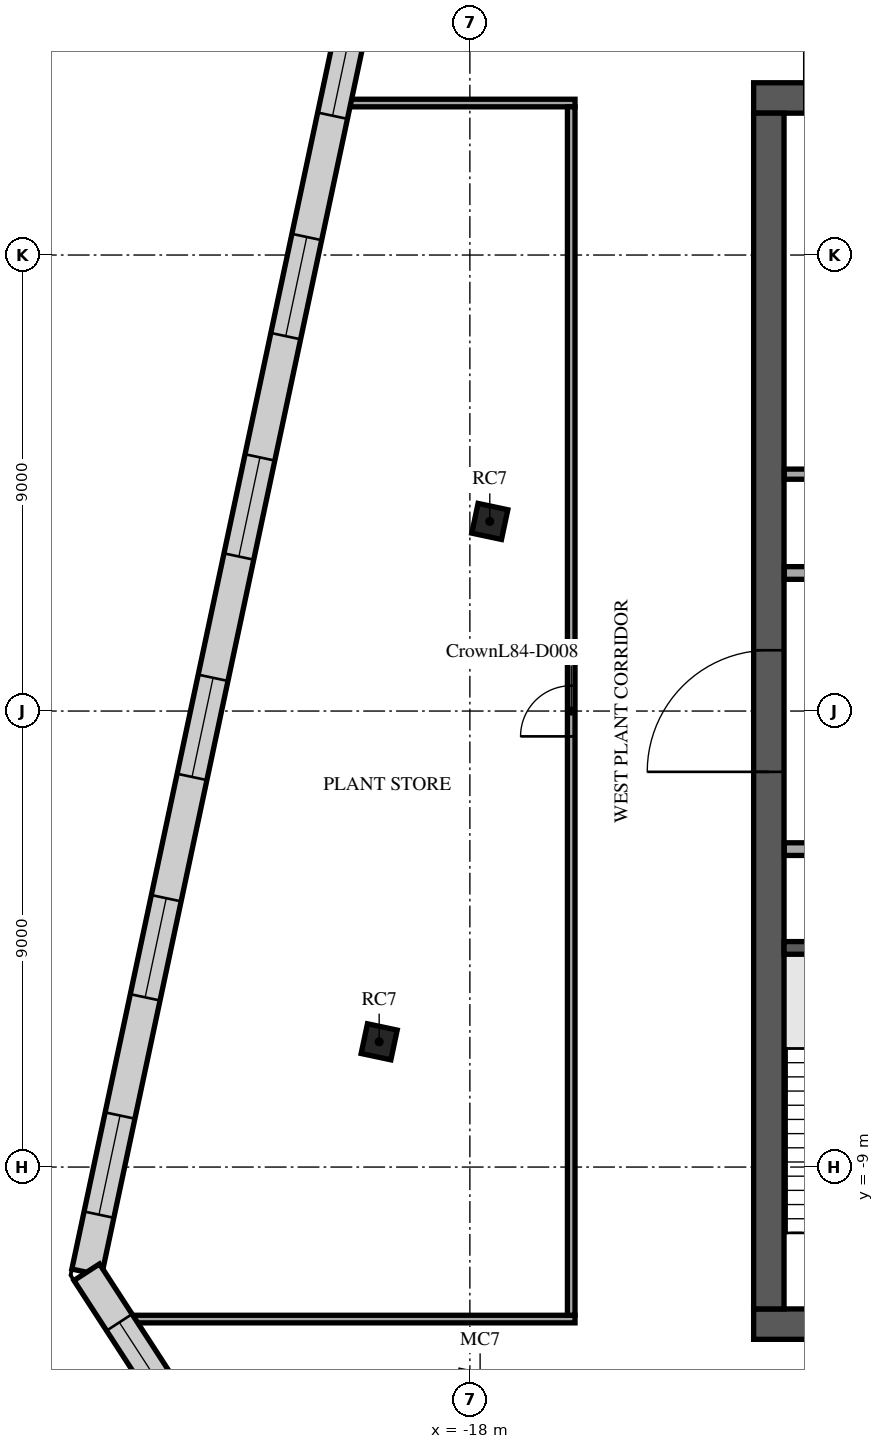
"""IFC4 building model, lengths in metres.
Left out: names, types, materials, properties, quantities, classifications, styles, units other than length and angle.
Written with IfcOpenShell. Run it as: python <this file> out.ifc"""

import sys

from ifc_helpers import new_model, si_unit, direction, frame, frame_2d, origin, origin_2d, place, context, subcontext, project, spatial, rectangle, extrude, element, fill, save


model = new_model("IFC4")
c1 = context("Model", 3, precision=1e-05, world=origin(), true_north=direction((0.0, 1.0)))
c2 = subcontext(c1, "Body", "Model", "MODEL_VIEW")
j1 = project(units=[si_unit("LENGTHUNIT", "METRE"), si_unit("PLANEANGLEUNIT", "RADIAN")], contexts=[c1])
p1 = place(None, origin())
s1 = spatial("IfcSite", under=j1, at=p1, CompositionType="ELEMENT")
p2 = place(p1, origin())
s2 = spatial("IfcBuilding", under=s1, at=p2, CompositionType="ELEMENT")
p3 = place(p2, frame((0.0, 0.0, 358.1)))
s3 = spatial("IfcBuildingStorey", under=s2, at=p3, CompositionType="ELEMENT", Elevation=358.1)
for number, where, z_axis, x_axis in (
    (1, (-17.607, 3.742, 0.0), (0.0, 0.0, 1.0), (0.208, 0.978, 0.0)),
    (2, (-19.79, -6.528, 0.0), (0.0, 0.0, 1.0), (0.208, 0.978, 0.0)),
):
    element("IfcColumn", number, at=place(p3, frame(where, z_axis=z_axis, x_axis=x_axis)), inside=s3, PredefinedType="COLUMN", context=c2, shape_type="SweptSolid", body=[
        extrude(rectangle(XDim=0.6, YDim=0.6, at=origin_2d()), origin(), (0.0, 0.0, 1.0), 5.0),
    ])
p4 = place(p3, frame((-12.4, 12.1, 0.0), z_axis=(0.0, 0.0, 1.0), x_axis=(1.0, 0.0, 0.0)))
e3 = element("IfcWall", 3, at=p4, inside=s3, PredefinedType="SHEAR", context=c2, shape_type="SweptSolid", body=[
    extrude(rectangle(XDim=24.8, YDim=0.6, at=frame_2d((12.4, 0.0))), origin(), (0.0, 0.0, 1.0), 4.7),
])
p5 = place(p4, frame((11.2, 0.0, 0.0)))
e4 = element("IfcOpeningElement", 4, at=p5, cuts=e3, PredefinedType="OPENING", context=c2, shape_type="SweptSolid", body=[
    extrude(rectangle(XDim=2.4, YDim=2.4, at=frame_2d((1.2, 1.2))), frame((0.0, 0.31, 0.0), z_axis=(0.0, -1.0, 0.0), x_axis=(1.0, 0.0, 0.0)), (0.0, 0.0, 1.0), 0.62),
])
p6 = place(p4, frame((22.025, 0.0, 0.0)))
e5 = element("IfcOpeningElement", 5, at=p6, cuts=e3, PredefinedType="OPENING", context=c2, shape_type="SweptSolid", body=[
    extrude(rectangle(XDim=1.2, YDim=2.1, at=frame_2d((0.6, 1.05))), frame((0.0, 0.31, 0.0), z_axis=(0.0, -1.0, 0.0), x_axis=(1.0, 0.0, 0.0)), (0.0, 0.0, 1.0), 0.62),
])
p7 = place(p4, frame((1.0, 0.0, 0.0)))
e6 = element("IfcOpeningElement", 6, at=p7, cuts=e3, PredefinedType="OPENING", context=c2, shape_type="SweptSolid", body=[
    extrude(rectangle(XDim=1.0, YDim=2.1, at=frame_2d((0.5, 1.05))), frame((0.0, 0.31, 0.0), z_axis=(0.0, -1.0, 0.0), x_axis=(1.0, 0.0, 0.0)), (0.0, 0.0, 1.0), 0.62),
])
p8 = place(p3, frame((-12.4, -12.1, 0.0), z_axis=(0.0, 0.0, 1.0), x_axis=(1.0, 0.0, 0.0)))
e7 = element("IfcWall", 7, at=p8, inside=s3, PredefinedType="SHEAR", context=c2, shape_type="SweptSolid", body=[
    extrude(rectangle(XDim=24.8, YDim=0.6, at=frame_2d((12.4, 0.0))), origin(), (0.0, 0.0, 1.0), 4.7),
])
p9 = place(p8, frame((7.3, 0.0, 0.0)))
e8 = element("IfcOpeningElement", 8, at=p9, cuts=e7, PredefinedType="OPENING", context=c2, shape_type="SweptSolid", body=[
    extrude(rectangle(XDim=2.0, YDim=2.1, at=frame_2d((1.0, 1.05))), frame((0.0, 0.31, 0.0), z_axis=(0.0, -1.0, 0.0), x_axis=(1.0, 0.0, 0.0)), (0.0, 0.0, 1.0), 0.62),
])
p10 = place(p8, frame((17.425, 0.0, 0.0)))
e9 = element("IfcOpeningElement", 9, at=p10, cuts=e7, PredefinedType="OPENING", context=c2, shape_type="SweptSolid", body=[
    extrude(rectangle(XDim=1.2, YDim=2.1, at=frame_2d((0.6, 1.05))), frame((0.0, 0.31, 0.0), z_axis=(0.0, -1.0, 0.0), x_axis=(1.0, 0.0, 0.0)), (0.0, 0.0, 1.0), 0.62),
])
p11 = place(p8, frame((1.575, 0.0, 0.0)))
e10 = element("IfcOpeningElement", 10, at=p11, cuts=e7, PredefinedType="OPENING", context=c2, shape_type="SweptSolid", body=[
    extrude(rectangle(XDim=1.2, YDim=2.1, at=frame_2d((0.6, 1.05))), frame((0.0, 0.31, 0.0), z_axis=(0.0, -1.0, 0.0), x_axis=(1.0, 0.0, 0.0)), (0.0, 0.0, 1.0), 0.62),
])
p12 = place(p8, frame((22.025, 0.0, 0.0)))
e11 = element("IfcOpeningElement", 11, at=p12, cuts=e7, PredefinedType="OPENING", context=c2, shape_type="SweptSolid", body=[
    extrude(rectangle(XDim=1.2, YDim=2.1, at=frame_2d((0.6, 1.05))), frame((0.0, 0.31, 0.0), z_axis=(0.0, -1.0, 0.0), x_axis=(1.0, 0.0, 0.0)), (0.0, 0.0, 1.0), 0.62),
])
p13 = place(p3, frame((-12.1, -11.8, 0.0), z_axis=(0.0, 0.0, 1.0), x_axis=(0.0, 1.0, 0.0)))
e12 = element("IfcWall", 12, at=p13, inside=s3, PredefinedType="SHEAR", context=c2, shape_type="SweptSolid", body=[
    extrude(rectangle(XDim=23.6, YDim=0.6, at=frame_2d((11.8, 0.0))), origin(), (0.0, 0.0, 1.0), 4.7),
])
p14 = place(p13, frame((10.6, 0.0, 0.0)))
e13 = element("IfcOpeningElement", 13, at=p14, cuts=e12, PredefinedType="OPENING", context=c2, shape_type="SweptSolid", body=[
    extrude(rectangle(XDim=2.4, YDim=2.4, at=frame_2d((1.2, 1.2))), frame((0.0, 0.31, 0.0), z_axis=(0.0, -1.0, 0.0), x_axis=(1.0, 0.0, 0.0)), (0.0, 0.0, 1.0), 0.62),
])
p15 = place(p3, frame((-8.65, -4.675, 0.0), z_axis=(0.0, 0.0, 1.0), x_axis=(-1.0, 0.0, 0.0)))
e14 = element("IfcWall", 14, at=p15, inside=s3, PredefinedType="SOLIDWALL", context=c2, shape_type="SweptSolid", body=[
    extrude(rectangle(XDim=3.15, YDim=0.25, at=frame_2d((1.575, 0.0))), origin(), (0.0, 0.0, 1.0), 4.7),
])
p16 = place(p3, frame((-11.795, -2.725, 0.0), z_axis=(0.0, 0.0, 1.0), x_axis=(1.0, 0.0, 0.0)))
e15 = element("IfcWall", 15, at=p16, inside=s3, PredefinedType="PARTITIONING", context=c2, shape_type="SweptSolid", body=[
    extrude(rectangle(XDim=14.415, YDim=0.25, at=frame_2d((7.208, 0.0))), origin(), (0.0, 0.0, 1.0), 4.7),
])
p17 = place(p16, frame((1.295, 0.0, 0.0)))
e16 = element("IfcOpeningElement", 16, at=p17, cuts=e15, PredefinedType="OPENING", context=c2, shape_type="SweptSolid", body=[
    extrude(rectangle(XDim=1.0, YDim=2.1, at=frame_2d((0.5, 1.05))), frame((0.0, 0.135, 0.0), z_axis=(0.0, -1.0, 0.0), x_axis=(1.0, 0.0, 0.0)), (0.0, 0.0, 1.0), 0.27),
])
p18 = place(p16, frame((4.42, 0.0, 0.0)))
e17 = element("IfcOpeningElement", 17, at=p18, cuts=e15, PredefinedType="OPENING", context=c2, shape_type="SweptSolid", body=[
    extrude(rectangle(XDim=1.0, YDim=2.1, at=frame_2d((0.5, 1.05))), frame((0.0, 0.135, 0.0), z_axis=(0.0, -1.0, 0.0), x_axis=(1.0, 0.0, 0.0)), (0.0, 0.0, 1.0), 0.27),
])
p19 = place(p16, frame((9.92, 0.0, 0.0)))
e18 = element("IfcOpeningElement", 18, at=p19, cuts=e15, PredefinedType="OPENING", context=c2, shape_type="SweptSolid", body=[
    extrude(rectangle(XDim=1.0, YDim=2.1, at=frame_2d((0.5, 1.05))), frame((0.0, 0.135, 0.0), z_axis=(0.0, -1.0, 0.0), x_axis=(1.0, 0.0, 0.0)), (0.0, 0.0, 1.0), 0.27),
])
p20 = place(p3, frame((-11.795, 2.725, 0.0), z_axis=(0.0, 0.0, 1.0), x_axis=(1.0, 0.0, 0.0)))
e19 = element("IfcWall", 19, at=p20, inside=s3, PredefinedType="PARTITIONING", context=c2, shape_type="SweptSolid", body=[
    extrude(rectangle(XDim=23.59, YDim=0.25, at=frame_2d((11.795, 0.0))), origin(), (0.0, 0.0, 1.0), 4.7),
])
p21 = place(p20, frame((21.345, 0.0, 0.0)))
e20 = element("IfcOpeningElement", 20, at=p21, cuts=e19, PredefinedType="OPENING", context=c2, shape_type="SweptSolid", body=[
    extrude(rectangle(XDim=0.9, YDim=2.1, at=frame_2d((0.45, 1.05))), frame((0.0, 0.135, 0.0), z_axis=(0.0, -1.0, 0.0), x_axis=(1.0, 0.0, 0.0)), (0.0, 0.0, 1.0), 0.27),
])
p22 = place(p20, frame((1.345, 0.0, 0.0)))
e21 = element("IfcOpeningElement", 21, at=p22, cuts=e19, PredefinedType="OPENING", context=c2, shape_type="SweptSolid", body=[
    extrude(rectangle(XDim=0.9, YDim=2.1, at=frame_2d((0.45, 1.05))), frame((0.0, 0.135, 0.0), z_axis=(0.0, -1.0, 0.0), x_axis=(1.0, 0.0, 0.0)), (0.0, 0.0, 1.0), 0.27),
])
p23 = place(p20, frame((4.32, 0.0, 0.0)))
e22 = element("IfcOpeningElement", 22, at=p23, cuts=e19, PredefinedType="OPENING", context=c2, shape_type="SweptSolid", body=[
    extrude(rectangle(XDim=1.2, YDim=2.1, at=frame_2d((0.6, 1.05))), frame((0.0, 0.135, 0.0), z_axis=(0.0, -1.0, 0.0), x_axis=(1.0, 0.0, 0.0)), (0.0, 0.0, 1.0), 0.27),
])
p24 = place(p20, frame((12.57, 0.0, 0.0)))
e23 = element("IfcOpeningElement", 23, at=p24, cuts=e19, PredefinedType="OPENING", context=c2, shape_type="SweptSolid", body=[
    extrude(rectangle(XDim=1.2, YDim=2.1, at=frame_2d((0.6, 1.05))), frame((0.0, 0.135, 0.0), z_axis=(0.0, -1.0, 0.0), x_axis=(1.0, 0.0, 0.0)), (0.0, 0.0, 1.0), 0.27),
])
p25 = place(p3, frame((-11.795, 4.675, 0.0), z_axis=(0.0, 0.0, 1.0), x_axis=(1.0, 0.0, 0.0)))
e24 = element("IfcWall", 24, at=p25, inside=s3, PredefinedType="PARTITIONING", context=c2, shape_type="SweptSolid", body=[
    extrude(rectangle(XDim=3.645, YDim=0.2, at=frame_2d((1.823, 0.0))), origin(), (0.0, 0.0, 1.0), 4.7),
])
p26 = place(p3, frame((-24.842, -12.0, 0.0), z_axis=(0.0, 0.0, 1.0), x_axis=(1.0, 0.0, 0.0)))
e25 = element("IfcWall", 25, at=p26, inside=s3, PredefinedType="PARTITIONING", context=c2, shape_type="SweptSolid", body=[
    extrude(rectangle(XDim=8.917, YDim=0.15, at=frame_2d((4.458, 0.0))), origin(), (0.0, 0.0, 1.0), 4.7),
])
p27 = place(p3, frame((-20.554, 12.0, 0.0), z_axis=(0.0, 0.0, 1.0), x_axis=(1.0, 0.0, 0.0)))
e26 = element("IfcWall", 26, at=p27, inside=s3, PredefinedType="PARTITIONING", context=c2, shape_type="SweptSolid", body=[
    extrude(rectangle(XDim=4.629, YDim=0.15, at=frame_2d((2.314, 0.0))), origin(), (0.0, 0.0, 1.0), 4.7),
])
p28 = place(p3, frame((-16.0, -11.925, 0.0), z_axis=(0.0, 0.0, 1.0), x_axis=(0.0, 1.0, 0.0)))
e27 = element("IfcWall", 27, at=p28, inside=s3, PredefinedType="PARTITIONING", context=c2, shape_type="SweptSolid", body=[
    extrude(rectangle(XDim=23.85, YDim=0.15, at=frame_2d((11.925, 0.0))), origin(), (0.0, 0.0, 1.0), 4.32),
])
p29 = place(p28, frame((11.425, 0.0, 0.0)))
e28 = element("IfcOpeningElement", 28, at=p29, cuts=e27, PredefinedType="OPENING", context=c2, shape_type="SweptSolid", body=[
    extrude(rectangle(XDim=1.0, YDim=2.1, at=frame_2d((0.5, 1.05))), frame((0.0, 0.085, 0.0), z_axis=(0.0, -1.0, 0.0), x_axis=(1.0, 0.0, 0.0)), (0.0, 0.0, 1.0), 0.17),
])
p30 = place(p3, frame((-19.141, 19.131, 0.0), z_axis=(0.0, 0.0, 1.0), x_axis=(-0.207913406719, -0.978147236006, 0.0)))
e29 = element("IfcWall", 29, at=p30, inside=s3, PredefinedType="STANDARD", context=c2, shape_type="SweptSolid", body=[
    extrude(rectangle(XDim=30.881, YDim=0.6, at=frame_2d((15.441, 0.0))), origin(), (0.0, 0.0, 1.0), 4.7),
])
p31 = place(p30, frame((1.161, 0.0, 0.6)))
e30 = element("IfcOpeningElement", 30, at=p31, cuts=e29, PredefinedType="OPENING", context=c2, shape_type="SweptSolid", body=[
    extrude(rectangle(XDim=2.0, YDim=3.35, at=frame_2d((1.0, 1.675))), frame((0.0, 0.31, 0.0), z_axis=(0.0, -1.0, 0.0), x_axis=(1.0, 0.0, 0.0)), (0.0, 0.0, 1.0), 0.62),
])
p32 = place(p30, frame((5.546, 0.0, 0.6)))
e31 = element("IfcOpeningElement", 31, at=p32, cuts=e29, PredefinedType="OPENING", context=c2, shape_type="SweptSolid", body=[
    extrude(rectangle(XDim=2.0, YDim=3.35, at=frame_2d((1.0, 1.675))), frame((0.0, 0.31, 0.0), z_axis=(0.0, -1.0, 0.0), x_axis=(1.0, 0.0, 0.0)), (0.0, 0.0, 1.0), 0.62),
])
p33 = place(p30, frame((9.994, 0.0, 0.6)))
e32 = element("IfcOpeningElement", 32, at=p33, cuts=e29, PredefinedType="OPENING", context=c2, shape_type="SweptSolid", body=[
    extrude(rectangle(XDim=2.0, YDim=3.35, at=frame_2d((1.0, 1.675))), frame((0.0, 0.31, 0.0), z_axis=(0.0, -1.0, 0.0), x_axis=(1.0, 0.0, 0.0)), (0.0, 0.0, 1.0), 0.62),
])
p34 = place(p30, frame((14.441, 0.0, 0.6)))
e33 = element("IfcOpeningElement", 33, at=p34, cuts=e29, PredefinedType="OPENING", context=c2, shape_type="SweptSolid", body=[
    extrude(rectangle(XDim=2.0, YDim=3.35, at=frame_2d((1.0, 1.675))), frame((0.0, 0.31, 0.0), z_axis=(0.0, -1.0, 0.0), x_axis=(1.0, 0.0, 0.0)), (0.0, 0.0, 1.0), 0.62),
])
p35 = place(p30, frame((18.888, 0.0, 0.6)))
e34 = element("IfcOpeningElement", 34, at=p35, cuts=e29, PredefinedType="OPENING", context=c2, shape_type="SweptSolid", body=[
    extrude(rectangle(XDim=2.0, YDim=3.35, at=frame_2d((1.0, 1.675))), frame((0.0, 0.31, 0.0), z_axis=(0.0, -1.0, 0.0), x_axis=(1.0, 0.0, 0.0)), (0.0, 0.0, 1.0), 0.62),
])
p36 = place(p30, frame((23.335, 0.0, 0.6)))
e35 = element("IfcOpeningElement", 35, at=p36, cuts=e29, PredefinedType="OPENING", context=c2, shape_type="SweptSolid", body=[
    extrude(rectangle(XDim=2.0, YDim=3.35, at=frame_2d((1.0, 1.675))), frame((0.0, 0.31, 0.0), z_axis=(0.0, -1.0, 0.0), x_axis=(1.0, 0.0, 0.0)), (0.0, 0.0, 1.0), 0.62),
])
p37 = place(p30, frame((27.72, 0.0, 0.6)))
e36 = element("IfcOpeningElement", 36, at=p37, cuts=e29, PredefinedType="OPENING", context=c2, shape_type="SweptSolid", body=[
    extrude(rectangle(XDim=2.0, YDim=3.35, at=frame_2d((1.0, 1.675))), frame((0.0, 0.31, 0.0), z_axis=(0.0, -1.0, 0.0), x_axis=(1.0, 0.0, 0.0)), (0.0, 0.0, 1.0), 0.62),
])
p38 = place(p3, frame((-25.561, -11.075, 0.0), z_axis=(0.0, 0.0, 1.0), x_axis=(0.544642093959, -0.838668581436, 0.0)))
e37 = element("IfcWall", 37, at=p38, inside=s3, PredefinedType="STANDARD", context=c2, shape_type="SweptSolid", body=[
    extrude(rectangle(XDim=13.509, YDim=0.6, at=frame_2d((6.754, 0.0))), origin(), (0.0, 0.0, 1.0), 4.7),
])
p39 = place(p38, frame((1.181, 0.0, 0.6)))
e38 = element("IfcOpeningElement", 38, at=p39, cuts=e37, PredefinedType="OPENING", context=c2, shape_type="SweptSolid", body=[
    extrude(rectangle(XDim=2.1, YDim=3.35, at=frame_2d((1.05, 1.675))), frame((0.0, 0.31, 0.0), z_axis=(0.0, -1.0, 0.0), x_axis=(1.0, 0.0, 0.0)), (0.0, 0.0, 1.0), 0.62),
])
p40 = place(p38, frame((5.704, 0.0, 0.6)))
e39 = element("IfcOpeningElement", 39, at=p40, cuts=e37, PredefinedType="OPENING", context=c2, shape_type="SweptSolid", body=[
    extrude(rectangle(XDim=2.1, YDim=3.35, at=frame_2d((1.05, 1.675))), frame((0.0, 0.31, 0.0), z_axis=(0.0, -1.0, 0.0), x_axis=(1.0, 0.0, 0.0)), (0.0, 0.0, 1.0), 0.62),
])
p41 = place(p38, frame((10.228, 0.0, 0.6)))
e40 = element("IfcOpeningElement", 40, at=p41, cuts=e37, PredefinedType="OPENING", context=c2, shape_type="SweptSolid", body=[
    extrude(rectangle(XDim=2.1, YDim=3.35, at=frame_2d((1.05, 1.675))), frame((0.0, 0.31, 0.0), z_axis=(0.0, -1.0, 0.0), x_axis=(1.0, 0.0, 0.0)), (0.0, 0.0, 1.0), 0.62),
])
p42 = place(p14, origin())
e41 = element("IfcDoor", 41, at=p42, inside=s3, OperationType="SINGLE_SWING_LEFT", PredefinedType="DOOR", context=c2, shape_type="SweptSolid", body=[
    extrude(rectangle(XDim=2.4, YDim=2.4, at=frame_2d((1.2, 1.2))), frame((0.0, 0.025, 0.0), z_axis=(0.0, -1.0, 0.0), x_axis=(1.0, 0.0, 0.0)), (0.0, 0.0, 1.0), 0.05),
])
fill(e13, e41)
p43 = place(p29, origin())
e42 = element("IfcDoor", 42, at=p43, inside=s3, OperationType="SINGLE_SWING_RIGHT", PredefinedType="DOOR", context=c2, shape_type="SweptSolid", body=[
    extrude(rectangle(XDim=1.0, YDim=2.1, at=frame_2d((0.5, 1.05))), frame((0.0, 0.025, 0.0), z_axis=(0.0, -1.0, 0.0), x_axis=(1.0, 0.0, 0.0)), (0.0, 0.0, 1.0), 0.05),
])
fill(e28, e42)
p44 = place(p32, origin())
e43 = element("IfcWindow", 43, at=p44, inside=s3, PartitioningType="SINGLE_PANEL", PredefinedType="USERDEFINED", context=c2, shape_type="SweptSolid", body=[
    extrude(rectangle(XDim=2.0, YDim=3.35, at=frame_2d((1.0, 1.675))), frame((0.0, 0.03, 0.0), z_axis=(0.0, -1.0, 0.0), x_axis=(1.0, 0.0, 0.0)), (0.0, 0.0, 1.0), 0.06),
])
fill(e31, e43)
p45 = place(p33, origin())
e44 = element("IfcWindow", 44, at=p45, inside=s3, PartitioningType="SINGLE_PANEL", PredefinedType="USERDEFINED", context=c2, shape_type="SweptSolid", body=[
    extrude(rectangle(XDim=2.0, YDim=3.35, at=frame_2d((1.0, 1.675))), frame((0.0, 0.03, 0.0), z_axis=(0.0, -1.0, 0.0), x_axis=(1.0, 0.0, 0.0)), (0.0, 0.0, 1.0), 0.06),
])
fill(e32, e44)
p46 = place(p34, origin())
e45 = element("IfcWindow", 45, at=p46, inside=s3, PartitioningType="SINGLE_PANEL", PredefinedType="USERDEFINED", context=c2, shape_type="SweptSolid", body=[
    extrude(rectangle(XDim=2.0, YDim=3.35, at=frame_2d((1.0, 1.675))), frame((0.0, 0.03, 0.0), z_axis=(0.0, -1.0, 0.0), x_axis=(1.0, 0.0, 0.0)), (0.0, 0.0, 1.0), 0.06),
])
fill(e33, e45)
p47 = place(p35, origin())
e46 = element("IfcWindow", 46, at=p47, inside=s3, PartitioningType="SINGLE_PANEL", PredefinedType="USERDEFINED", context=c2, shape_type="SweptSolid", body=[
    extrude(rectangle(XDim=2.0, YDim=3.35, at=frame_2d((1.0, 1.675))), frame((0.0, 0.03, 0.0), z_axis=(0.0, -1.0, 0.0), x_axis=(1.0, 0.0, 0.0)), (0.0, 0.0, 1.0), 0.06),
])
fill(e34, e46)
p48 = place(p36, origin())
e47 = element("IfcWindow", 47, at=p48, inside=s3, PartitioningType="SINGLE_PANEL", PredefinedType="USERDEFINED", context=c2, shape_type="SweptSolid", body=[
    extrude(rectangle(XDim=2.0, YDim=3.35, at=frame_2d((1.0, 1.675))), frame((0.0, 0.03, 0.0), z_axis=(0.0, -1.0, 0.0), x_axis=(1.0, 0.0, 0.0)), (0.0, 0.0, 1.0), 0.06),
])
fill(e35, e47)
p49 = place(p37, origin())
e48 = element("IfcWindow", 48, at=p49, inside=s3, PartitioningType="SINGLE_PANEL", PredefinedType="USERDEFINED", context=c2, shape_type="SweptSolid", body=[
    extrude(rectangle(XDim=2.0, YDim=3.35, at=frame_2d((1.0, 1.675))), frame((0.0, 0.03, 0.0), z_axis=(0.0, -1.0, 0.0), x_axis=(1.0, 0.0, 0.0)), (0.0, 0.0, 1.0), 0.06),
])
fill(e36, e48)
p50 = place(p39, origin())
e49 = element("IfcWindow", 49, at=p50, inside=s3, PartitioningType="SINGLE_PANEL", PredefinedType="USERDEFINED", context=c2, shape_type="SweptSolid", body=[
    extrude(rectangle(XDim=2.1, YDim=3.35, at=frame_2d((1.05, 1.675))), frame((0.0, 0.03, 0.0), z_axis=(0.0, -1.0, 0.0), x_axis=(1.0, 0.0, 0.0)), (0.0, 0.0, 1.0), 0.06),
])
fill(e38, e49)
save(model, sys.argv[1])
